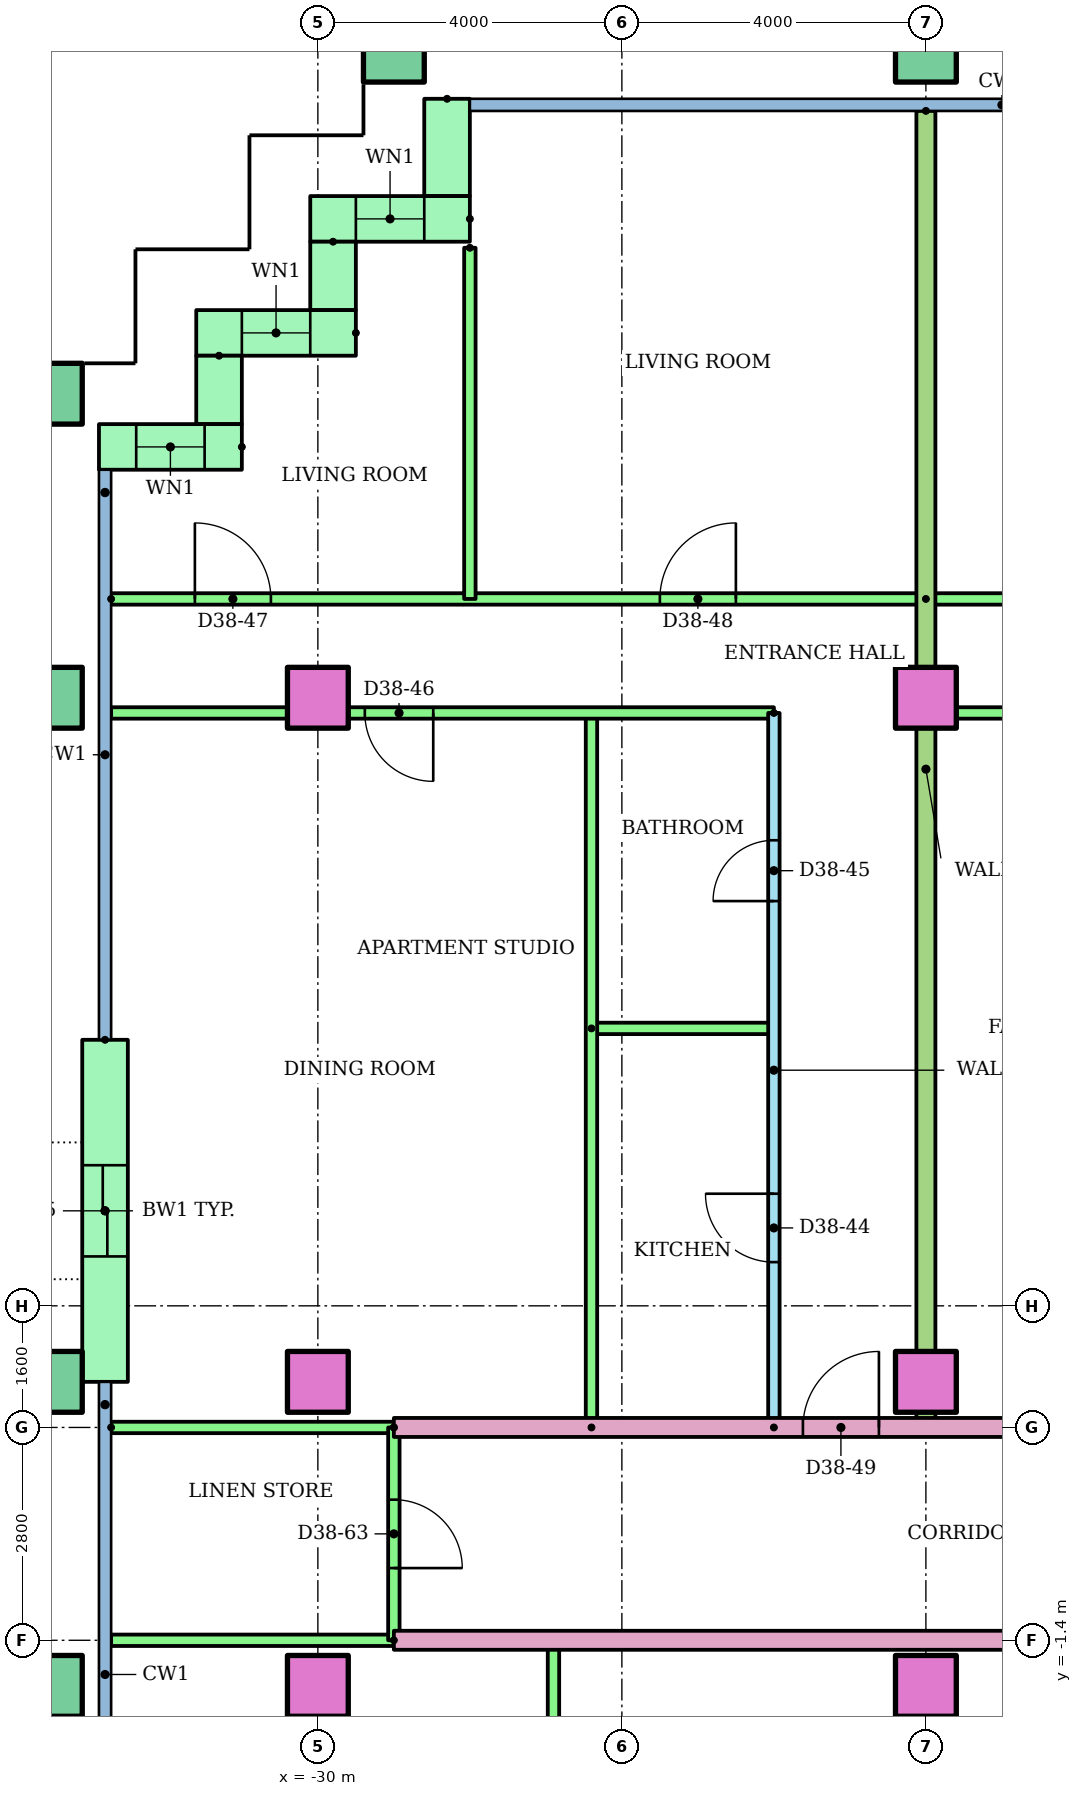
"""IFC4 building model, lengths in metres.
Left out: names, types, materials, properties, quantities, classifications, styles, units other than length and angle.
Written with IfcOpenShell. Run it as: python <this file> out.ifc"""

import sys

from ifc_helpers import new_model, si_unit, direction, frame, frame_2d, origin, origin_2d, place, context, subcontext, project, spatial, rectangle, hollow_rectangle, extrude, element, fill, save


model = new_model("IFC4")
c1 = context("Model", 3, precision=1e-05, world=origin(), true_north=direction((0.0, 1.0)))
c2 = subcontext(c1, "Body", "Model", "MODEL_VIEW")
j1 = project(units=[si_unit("LENGTHUNIT", "METRE"), si_unit("PLANEANGLEUNIT", "RADIAN")], contexts=[c1])
p1 = place(None, origin())
s1 = spatial("IfcSite", under=j1, at=p1, CompositionType="ELEMENT")
p2 = place(p1, origin())
s2 = spatial("IfcBuilding", under=s1, at=p2, CompositionType="ELEMENT")
p3 = place(p2, frame((0.0, 0.0, 145.4)))
s3 = spatial("IfcBuildingStorey", under=s2, at=p3, CompositionType="ELEMENT", Elevation=145.4)
p4 = place(p3, frame((-33.5, -2.0, 0.0)))
e1 = element("IfcColumn", 1, at=p4, inside=s3, PredefinedType="COLUMN", context=c2, shape_type="SweptSolid", body=[
    extrude(hollow_rectangle(XDim=0.8, YDim=0.8, WallThickness=0.04, at=origin_2d()), origin(), (0.0, 0.0, 1.0), 3.2),
])
for number, where in (
    (2, (-30.0, -2.0, 0.0)),
    (3, (-22.0, -2.0, 0.0)),
):
    element("IfcColumn", number, at=place(p3, frame(where)), inside=s3, PredefinedType="COLUMN", context=c2, shape_type="SweptSolid", body=[
        extrude(rectangle(XDim=0.8, YDim=0.8, at=origin_2d()), origin(), (0.0, 0.0, 1.0), 3.2),
    ])
p5 = place(p3, frame((-33.5, 2.0, 0.0)))
e4 = element("IfcColumn", 4, at=p5, inside=s3, PredefinedType="COLUMN", context=c2, shape_type="SweptSolid", body=[
    extrude(hollow_rectangle(XDim=0.8, YDim=0.8, WallThickness=0.04, at=origin_2d()), origin(), (0.0, 0.0, 1.0), 3.2),
])
for number, where in (
    (5, (-30.0, 2.0, 0.0)),
    (6, (-22.0, 2.0, 0.0)),
):
    element("IfcColumn", number, at=place(p3, frame(where)), inside=s3, PredefinedType="COLUMN", context=c2, shape_type="SweptSolid", body=[
        extrude(rectangle(XDim=0.8, YDim=0.8, at=origin_2d()), origin(), (0.0, 0.0, 1.0), 3.2),
    ])
p6 = place(p3, frame((-33.5, 11.0, 0.0)))
e7 = element("IfcColumn", 7, at=p6, inside=s3, PredefinedType="COLUMN", context=c2, shape_type="SweptSolid", body=[
    extrude(hollow_rectangle(XDim=0.8, YDim=0.8, WallThickness=0.04, at=origin_2d()), origin(), (0.0, 0.0, 1.0), 3.2),
])
for number, where in (
    (8, (-30.0, 11.0, 0.0)),
    (9, (-22.0, 11.0, 0.0)),
):
    element("IfcColumn", number, at=place(p3, frame(where)), inside=s3, PredefinedType="COLUMN", context=c2, shape_type="SweptSolid", body=[
        extrude(rectangle(XDim=0.8, YDim=0.8, at=origin_2d()), origin(), (0.0, 0.0, 1.0), 3.2),
    ])
for number, where in (
    (10, (-33.5, 15.0, 0.0)),
    (11, (-29.0, 19.5, 0.0)),
    (12, (-22.0, 19.5, 0.0)),
):
    element("IfcColumn", number, at=place(p3, frame(where)), inside=s3, PredefinedType="COLUMN", context=c2, shape_type="SweptSolid", body=[
        extrude(hollow_rectangle(XDim=0.8, YDim=0.8, WallThickness=0.04, at=origin_2d()), origin(), (0.0, 0.0, 1.0), 3.2),
    ])
p7 = place(p3, frame((-28.3, 18.88, 0.0), z_axis=(0.0, 0.0, 1.0), x_axis=(0.0, -1.0, 0.0)))
e13 = element("IfcWall", 13, at=p7, inside=s3, PredefinedType="STANDARD", context=c2, shape_type="SweptSolid", body=[
    extrude(rectangle(XDim=1.28, YDim=0.6, at=frame_2d((0.64, 0.0))), origin(), (0.0, 0.0, 1.0), 2.92),
])
p8 = place(p3, frame((-28.0, 17.3, 0.0), z_axis=(0.0, 0.0, 1.0), x_axis=(-1.0, 0.0, 0.0)))
e14 = element("IfcWall", 14, at=p8, inside=s3, PredefinedType="STANDARD", context=c2, shape_type="SweptSolid", body=[
    extrude(rectangle(XDim=2.1, YDim=0.6, at=frame_2d((1.05, 0.0))), origin(), (0.0, 0.0, 1.0), 2.92),
])
p9 = place(p8, frame((0.6, 0.0, 0.9)))
e15 = element("IfcOpeningElement", 15, at=p9, cuts=e14, PredefinedType="OPENING", context=c2, shape_type="SweptSolid", body=[
    extrude(rectangle(XDim=0.9, YDim=1.5, at=frame_2d((0.45, 0.75))), frame((0.0, 0.31, 0.0), z_axis=(0.0, -1.0, 0.0), x_axis=(1.0, 0.0, 0.0)), (0.0, 0.0, 1.0), 0.62),
])
p10 = place(p3, frame((-29.8, 17.0, 0.0), z_axis=(0.0, 0.0, 1.0), x_axis=(0.0, -1.0, 0.0)))
e16 = element("IfcWall", 16, at=p10, inside=s3, PredefinedType="STANDARD", context=c2, shape_type="SweptSolid", body=[
    extrude(rectangle(XDim=0.9, YDim=0.6, at=frame_2d((0.45, 0.0))), origin(), (0.0, 0.0, 1.0), 2.92),
])
p11 = place(p3, frame((-29.5, 15.8, 0.0), z_axis=(0.0, 0.0, 1.0), x_axis=(-1.0, 0.0, 0.0)))
e17 = element("IfcWall", 17, at=p11, inside=s3, PredefinedType="STANDARD", context=c2, shape_type="SweptSolid", body=[
    extrude(rectangle(XDim=2.1, YDim=0.6, at=frame_2d((1.05, 0.0))), origin(), (0.0, 0.0, 1.0), 2.92),
])
p12 = place(p11, frame((0.6, 0.0, 0.9)))
e18 = element("IfcOpeningElement", 18, at=p12, cuts=e17, PredefinedType="OPENING", context=c2, shape_type="SweptSolid", body=[
    extrude(rectangle(XDim=0.9, YDim=1.5, at=frame_2d((0.45, 0.75))), frame((0.0, 0.31, 0.0), z_axis=(0.0, -1.0, 0.0), x_axis=(1.0, 0.0, 0.0)), (0.0, 0.0, 1.0), 0.62),
])
p13 = place(p3, frame((-31.3, 15.5, 0.0), z_axis=(0.0, 0.0, 1.0), x_axis=(0.0, -1.0, 0.0)))
e19 = element("IfcWall", 19, at=p13, inside=s3, PredefinedType="STANDARD", context=c2, shape_type="SweptSolid", body=[
    extrude(rectangle(XDim=0.9, YDim=0.6, at=frame_2d((0.45, 0.0))), origin(), (0.0, 0.0, 1.0), 2.92),
])
p14 = place(p3, frame((-31.0, 14.3, 0.0), z_axis=(0.0, 0.0, 1.0), x_axis=(-1.0, 0.0, 0.0)))
e20 = element("IfcWall", 20, at=p14, inside=s3, PredefinedType="STANDARD", context=c2, shape_type="SweptSolid", body=[
    extrude(rectangle(XDim=1.88, YDim=0.6, at=frame_2d((0.94, 0.0))), origin(), (0.0, 0.0, 1.0), 2.92),
])
p15 = place(p14, frame((0.49, 0.0, 0.9)))
e21 = element("IfcOpeningElement", 21, at=p15, cuts=e20, PredefinedType="OPENING", context=c2, shape_type="SweptSolid", body=[
    extrude(rectangle(XDim=0.9, YDim=1.5, at=frame_2d((0.45, 0.75))), frame((0.0, 0.31, 0.0), z_axis=(0.0, -1.0, 0.0), x_axis=(1.0, 0.0, 0.0)), (0.0, 0.0, 1.0), 0.62),
])
p16 = place(p3, frame((-32.8, 6.5, 0.0), z_axis=(0.0, 0.0, 1.0), x_axis=(0.0, -1.0, 0.0)))
e22 = element("IfcWall", 22, at=p16, inside=s3, PredefinedType="STANDARD", context=c2, shape_type="SweptSolid", body=[
    extrude(rectangle(XDim=4.5, YDim=0.6, at=frame_2d((2.25, 0.0))), origin(), (0.0, 0.0, 1.0), 2.92),
])
p17 = place(p16, frame((1.65, 0.0, 0.0)))
e23 = element("IfcOpeningElement", 23, at=p17, cuts=e22, PredefinedType="OPENING", context=c2, shape_type="SweptSolid", body=[
    extrude(rectangle(XDim=1.2, YDim=2.1, at=frame_2d((0.6, 1.05))), frame((0.0, 0.31, 0.0), z_axis=(0.0, -1.0, 0.0), x_axis=(1.0, 0.0, 0.0)), (0.0, 0.0, 1.0), 0.62),
])
p18 = place(p3, frame((-26.9, -8.4, 0.0), z_axis=(0.0, 0.0, 1.0), x_axis=(0.0, 1.0, 0.0)))
e24 = element("IfcWall", 24, at=p18, inside=s3, PredefinedType="PARTITIONING", context=c2, shape_type="SweptSolid", body=[
    extrude(rectangle(XDim=7.0, YDim=0.15, at=frame_2d((3.5, 0.0))), origin(), (0.0, 0.0, 1.0), 2.4),
])
p19 = place(p3, frame((-14.0, -1.4, 0.0), z_axis=(0.0, 0.0, 1.0), x_axis=(-1.0, 0.0, 0.0)))
e25 = element("IfcWall", 25, at=p19, inside=s3, PredefinedType="PARTITIONING", context=c2, shape_type="SweptSolid", body=[
    extrude(rectangle(XDim=15.0, YDim=0.25, at=frame_2d((7.5, 0.0))), origin(), (0.0, 0.0, 1.0), 2.4),
])
p20 = place(p3, frame((-29.0, -1.4, 0.0), z_axis=(0.0, 0.0, 1.0), x_axis=(-1.0, 0.0, 0.0)))
e26 = element("IfcWall", 26, at=p20, inside=s3, PredefinedType="PARTITIONING", context=c2, shape_type="SweptSolid", body=[
    extrude(rectangle(XDim=3.72, YDim=0.15, at=frame_2d((1.86, 0.0))), origin(), (0.0, 0.0, 1.0), 2.4),
])
p21 = place(p3, frame((-24.0, 1.4, 0.0), z_axis=(0.0, 0.0, 1.0), x_axis=(0.0, 1.0, 0.0)))
e27 = element("IfcWall", 27, at=p21, inside=s3, PredefinedType="PARTITIONING", context=c2, shape_type="SweptSolid", body=[
    extrude(rectangle(XDim=9.4, YDim=0.15, at=frame_2d((4.7, 0.0))), origin(), (0.0, 0.0, 1.0), 2.4),
])
p22 = place(p21, frame((2.175, 0.0, 0.0)))
e28 = element("IfcOpeningElement", 28, at=p22, cuts=e27, PredefinedType="OPENING", context=c2, shape_type="SweptSolid", body=[
    extrude(rectangle(XDim=0.9, YDim=2.1, at=frame_2d((0.45, 1.05))), frame((0.0, 0.085, 0.0), z_axis=(0.0, -1.0, 0.0), x_axis=(1.0, 0.0, 0.0)), (0.0, 0.0, 1.0), 0.17),
])
p23 = place(p21, frame((6.925, 0.0, 0.0)))
e29 = element("IfcOpeningElement", 29, at=p23, cuts=e27, PredefinedType="OPENING", context=c2, shape_type="SweptSolid", body=[
    extrude(rectangle(XDim=0.8, YDim=2.1, at=frame_2d((0.4, 1.05))), frame((0.0, 0.085, 0.0), z_axis=(0.0, -1.0, 0.0), x_axis=(1.0, 0.0, 0.0)), (0.0, 0.0, 1.0), 0.17),
])
p24 = place(p3, frame((-26.4, 6.65, 0.0)))
e30 = element("IfcWall", 30, at=p24, inside=s3, PredefinedType="PARTITIONING", context=c2, shape_type="SweptSolid", body=[
    extrude(rectangle(XDim=2.4, YDim=0.15, at=frame_2d((1.2, 0.0))), origin(), (0.0, 0.0, 1.0), 2.4),
])
p25 = place(p3, frame((-26.4, 1.4, 0.0), z_axis=(0.0, 0.0, 1.0), x_axis=(0.0, 1.0, 0.0)))
e31 = element("IfcWall", 31, at=p25, inside=s3, PredefinedType="PARTITIONING", context=c2, shape_type="SweptSolid", body=[
    extrude(rectangle(XDim=9.4, YDim=0.15, at=frame_2d((4.7, 0.0))), origin(), (0.0, 0.0, 1.0), 2.4),
])
p26 = place(p3, frame((-24.0, 10.8, 0.0), z_axis=(0.0, 0.0, 1.0), x_axis=(-1.0, 0.0, 0.0)))
e32 = element("IfcWall", 32, at=p26, inside=s3, PredefinedType="PARTITIONING", context=c2, shape_type="SweptSolid", body=[
    extrude(rectangle(XDim=8.72, YDim=0.15, at=frame_2d((4.36, 0.0))), origin(), (0.0, 0.0, 1.0), 2.4),
])
p27 = place(p26, frame((4.482, 0.0, 0.0)))
e33 = element("IfcOpeningElement", 33, at=p27, cuts=e32, PredefinedType="OPENING", context=c2, shape_type="SweptSolid", body=[
    extrude(rectangle(XDim=0.9, YDim=2.1, at=frame_2d((0.45, 1.05))), frame((0.0, 0.085, 0.0), z_axis=(0.0, -1.0, 0.0), x_axis=(1.0, 0.0, 0.0)), (0.0, 0.0, 1.0), 0.17),
])
p28 = place(p3, frame((-32.72, 12.3, 0.0)))
e34 = element("IfcWall", 34, at=p28, inside=s3, PredefinedType="PARTITIONING", context=c2, shape_type="SweptSolid", body=[
    extrude(rectangle(XDim=10.72, YDim=0.15, at=frame_2d((5.36, 0.0))), origin(), (0.0, 0.0, 1.0), 2.4),
])
p29 = place(p28, frame((1.102, 0.0, 0.0)))
e35 = element("IfcOpeningElement", 35, at=p29, cuts=e34, PredefinedType="OPENING", context=c2, shape_type="SweptSolid", body=[
    extrude(rectangle(XDim=1.0, YDim=2.1, at=frame_2d((0.5, 1.05))), frame((0.0, 0.085, 0.0), z_axis=(0.0, -1.0, 0.0), x_axis=(1.0, 0.0, 0.0)), (0.0, 0.0, 1.0), 0.17),
])
p30 = place(p28, frame((7.22, 0.0, 0.0)))
e36 = element("IfcOpeningElement", 36, at=p30, cuts=e34, PredefinedType="OPENING", context=c2, shape_type="SweptSolid", body=[
    extrude(rectangle(XDim=1.0, YDim=2.1, at=frame_2d((0.5, 1.05))), frame((0.0, 0.085, 0.0), z_axis=(0.0, -1.0, 0.0), x_axis=(1.0, 0.0, 0.0)), (0.0, 0.0, 1.0), 0.17),
])
p31 = place(p3, frame((-28.0, 16.92, 0.0), z_axis=(0.0, 0.0, 1.0), x_axis=(0.0, -1.0, 0.0)))
e37 = element("IfcWall", 37, at=p31, inside=s3, PredefinedType="PARTITIONING", context=c2, shape_type="SweptSolid", body=[
    extrude(rectangle(XDim=4.62, YDim=0.15, at=frame_2d((2.31, 0.0))), origin(), (0.0, 0.0, 1.0), 2.4),
])
p32 = place(p3, frame((-16.0, 10.8, 0.0), z_axis=(0.0, 0.0, 1.0), x_axis=(-1.0, 0.0, 0.0)))
e38 = element("IfcWall", 38, at=p32, inside=s3, PredefinedType="PARTITIONING", context=c2, shape_type="SweptSolid", body=[
    extrude(rectangle(XDim=6.0, YDim=0.15, at=frame_2d((3.0, 0.0))), origin(), (0.0, 0.0, 1.0), 2.4),
])
p33 = place(p32, frame((3.75, 0.0, 0.0)))
e39 = element("IfcOpeningElement", 39, at=p33, cuts=e38, PredefinedType="OPENING", context=c2, shape_type="SweptSolid", body=[
    extrude(rectangle(XDim=0.9, YDim=2.1, at=frame_2d((0.45, 1.05))), frame((0.0, 0.085, 0.0), z_axis=(0.0, -1.0, 0.0), x_axis=(1.0, 0.0, 0.0)), (0.0, 0.0, 1.0), 0.17),
])
p34 = place(p3, frame((-22.0, 12.3, 0.0)))
e40 = element("IfcWall", 40, at=p34, inside=s3, PredefinedType="PARTITIONING", context=c2, shape_type="SweptSolid", body=[
    extrude(rectangle(XDim=8.0, YDim=0.15, at=frame_2d((4.0, 0.0))), origin(), (0.0, 0.0, 1.0), 2.4),
])
p35 = place(p34, frame((3.5, 0.0, 0.0)))
e41 = element("IfcOpeningElement", 41, at=p35, cuts=e40, PredefinedType="OPENING", context=c2, shape_type="SweptSolid", body=[
    extrude(rectangle(XDim=1.0, YDim=2.1, at=frame_2d((0.5, 1.05))), frame((0.0, 0.085, 0.0), z_axis=(0.0, -1.0, 0.0), x_axis=(1.0, 0.0, 0.0)), (0.0, 0.0, 1.0), 0.17),
])
p36 = place(p3, frame((-22.0, 18.721, 0.0), z_axis=(0.0, 0.0, 1.0), x_axis=(0.0, -1.0, 0.0)))
e42 = element("IfcWall", 42, at=p36, inside=s3, PredefinedType="PARTITIONING", context=c2, shape_type="SweptSolid", body=[
    extrude(rectangle(XDim=17.321, YDim=0.25, at=frame_2d((8.661, 0.0))), origin(), (0.0, 0.0, 1.0), 2.4),
])
p37 = place(p3, frame((-29.0, 1.4, 0.0)))
e43 = element("IfcWall", 43, at=p37, inside=s3, PredefinedType="PARTITIONING", context=c2, shape_type="SweptSolid", body=[
    extrude(rectangle(XDim=15.0, YDim=0.25, at=frame_2d((7.5, 0.0))), origin(), (0.0, 0.0, 1.0), 2.4),
])
p38 = place(p37, frame((5.382, 0.0, 0.0)))
e44 = element("IfcOpeningElement", 44, at=p38, cuts=e43, PredefinedType="OPENING", context=c2, shape_type="SweptSolid", body=[
    extrude(rectangle(XDim=1.0, YDim=2.1, at=frame_2d((0.5, 1.05))), frame((0.0, 0.135, 0.0), z_axis=(0.0, -1.0, 0.0), x_axis=(1.0, 0.0, 0.0)), (0.0, 0.0, 1.0), 0.27),
])
p39 = place(p37, frame((13.5, 0.0, 0.0)))
e45 = element("IfcOpeningElement", 45, at=p39, cuts=e43, PredefinedType="OPENING", context=c2, shape_type="SweptSolid", body=[
    extrude(rectangle(XDim=1.0, YDim=2.1, at=frame_2d((0.5, 1.05))), frame((0.0, 0.135, 0.0), z_axis=(0.0, -1.0, 0.0), x_axis=(1.0, 0.0, 0.0)), (0.0, 0.0, 1.0), 0.27),
])
p40 = place(p3, frame((-32.72, 1.4, 0.0)))
e46 = element("IfcWall", 46, at=p40, inside=s3, PredefinedType="PARTITIONING", context=c2, shape_type="SweptSolid", body=[
    extrude(rectangle(XDim=3.72, YDim=0.15, at=frame_2d((1.86, 0.0))), origin(), (0.0, 0.0, 1.0), 2.4),
])
p41 = place(p3, frame((-29.0, 1.4, 0.0), z_axis=(0.0, 0.0, 1.0), x_axis=(0.0, -1.0, 0.0)))
e47 = element("IfcWall", 47, at=p41, inside=s3, PredefinedType="PARTITIONING", context=c2, shape_type="SweptSolid", body=[
    extrude(rectangle(XDim=2.8, YDim=0.15, at=frame_2d((1.4, 0.0))), origin(), (0.0, 0.0, 1.0), 2.4),
])
p42 = place(p41, frame((0.95, 0.0, 0.0)))
e48 = element("IfcOpeningElement", 48, at=p42, cuts=e47, PredefinedType="OPENING", context=c2, shape_type="SweptSolid", body=[
    extrude(rectangle(XDim=0.9, YDim=2.1, at=frame_2d((0.45, 1.05))), frame((0.0, 0.085, 0.0), z_axis=(0.0, -1.0, 0.0), x_axis=(1.0, 0.0, 0.0)), (0.0, 0.0, 1.0), 0.17),
])
p43 = place(p9, origin())
e49 = element("IfcWindow", 49, at=p43, inside=s3, PartitioningType="SINGLE_PANEL", PredefinedType="WINDOW", context=c2, shape_type="SweptSolid", body=[
    extrude(rectangle(XDim=0.9, YDim=1.5, at=frame_2d((0.45, 0.75))), frame((0.0, 0.03, 0.0), z_axis=(0.0, -1.0, 0.0), x_axis=(1.0, 0.0, 0.0)), (0.0, 0.0, 1.0), 0.06),
])
fill(e15, e49)
p44 = place(p12, origin())
e50 = element("IfcWindow", 50, at=p44, inside=s3, PartitioningType="SINGLE_PANEL", PredefinedType="WINDOW", context=c2, shape_type="SweptSolid", body=[
    extrude(rectangle(XDim=0.9, YDim=1.5, at=frame_2d((0.45, 0.75))), frame((0.0, 0.03, 0.0), z_axis=(0.0, -1.0, 0.0), x_axis=(1.0, 0.0, 0.0)), (0.0, 0.0, 1.0), 0.06),
])
fill(e18, e50)
p45 = place(p15, origin())
e51 = element("IfcWindow", 51, at=p45, inside=s3, PartitioningType="SINGLE_PANEL", PredefinedType="WINDOW", context=c2, shape_type="SweptSolid", body=[
    extrude(rectangle(XDim=0.9, YDim=1.5, at=frame_2d((0.45, 0.75))), frame((0.0, 0.03, 0.0), z_axis=(0.0, -1.0, 0.0), x_axis=(1.0, 0.0, 0.0)), (0.0, 0.0, 1.0), 0.06),
])
fill(e21, e51)
p46 = place(p22, origin())
e52 = element("IfcDoor", 52, at=p46, inside=s3, OperationType="SINGLE_SWING_RIGHT", PredefinedType="DOOR", context=c2, shape_type="SweptSolid", body=[
    extrude(rectangle(XDim=0.9, YDim=2.1, at=frame_2d((0.45, 1.05))), frame((0.0, 0.025, 0.0), z_axis=(0.0, -1.0, 0.0), x_axis=(1.0, 0.0, 0.0)), (0.0, 0.0, 1.0), 0.05),
])
fill(e28, e52)
p47 = place(p23, origin())
e53 = element("IfcDoor", 53, at=p47, inside=s3, OperationType="SINGLE_SWING_LEFT", PredefinedType="DOOR", context=c2, shape_type="SweptSolid", body=[
    extrude(rectangle(XDim=0.8, YDim=2.1, at=frame_2d((0.4, 1.05))), frame((0.0, 0.025, 0.0), z_axis=(0.0, -1.0, 0.0), x_axis=(1.0, 0.0, 0.0)), (0.0, 0.0, 1.0), 0.05),
])
fill(e29, e53)
p48 = place(p27, origin())
e54 = element("IfcDoor", 54, at=p48, inside=s3, OperationType="SINGLE_SWING_LEFT", PredefinedType="DOOR", context=c2, shape_type="SweptSolid", body=[
    extrude(rectangle(XDim=0.9, YDim=2.1, at=frame_2d((0.45, 1.05))), frame((0.0, 0.025, 0.0), z_axis=(0.0, -1.0, 0.0), x_axis=(1.0, 0.0, 0.0)), (0.0, 0.0, 1.0), 0.05),
])
fill(e33, e54)
p49 = place(p29, origin())
e55 = element("IfcDoor", 55, at=p49, inside=s3, OperationType="SINGLE_SWING_LEFT", PredefinedType="DOOR", context=c2, shape_type="SweptSolid", body=[
    extrude(rectangle(XDim=1.0, YDim=2.1, at=frame_2d((0.5, 1.05))), frame((0.0, 0.025, 0.0), z_axis=(0.0, -1.0, 0.0), x_axis=(1.0, 0.0, 0.0)), (0.0, 0.0, 1.0), 0.05),
])
fill(e35, e55)
p50 = place(p30, origin())
e56 = element("IfcDoor", 56, at=p50, inside=s3, OperationType="SINGLE_SWING_RIGHT", PredefinedType="DOOR", context=c2, shape_type="SweptSolid", body=[
    extrude(rectangle(XDim=1.0, YDim=2.1, at=frame_2d((0.5, 1.05))), frame((0.0, 0.025, 0.0), z_axis=(0.0, -1.0, 0.0), x_axis=(1.0, 0.0, 0.0)), (0.0, 0.0, 1.0), 0.05),
])
fill(e36, e56)
p51 = place(p38, origin())
e57 = element("IfcDoor", 57, at=p51, inside=s3, OperationType="SINGLE_SWING_RIGHT", PredefinedType="DOOR", context=c2, shape_type="SweptSolid", body=[
    extrude(rectangle(XDim=1.0, YDim=2.1, at=frame_2d((0.5, 1.05))), frame((0.0, 0.025, 0.0), z_axis=(0.0, -1.0, 0.0), x_axis=(1.0, 0.0, 0.0)), (0.0, 0.0, 1.0), 0.05),
])
fill(e44, e57)
p52 = place(p42, origin())
e58 = element("IfcDoor", 58, at=p52, inside=s3, OperationType="SINGLE_SWING_RIGHT", PredefinedType="DOOR", context=c2, shape_type="SweptSolid", body=[
    extrude(rectangle(XDim=0.9, YDim=2.1, at=frame_2d((0.45, 1.05))), frame((0.0, 0.025, 0.0), z_axis=(0.0, -1.0, 0.0), x_axis=(1.0, 0.0, 0.0)), (0.0, 0.0, 1.0), 0.05),
])
fill(e48, e58)
p53 = place(p17, origin())
e59 = element("IfcDoor", 59, at=p53, inside=s3, OperationType="SLIDING_TO_LEFT", PredefinedType="DOOR", context=c2, shape_type="SweptSolid", body=[
    extrude(rectangle(XDim=1.2, YDim=2.1, at=frame_2d((0.6, 1.05))), frame((0.0, 0.025, 0.0), z_axis=(0.0, -1.0, 0.0), x_axis=(1.0, 0.0, 0.0)), (0.0, 0.0, 1.0), 0.05),
])
fill(e23, e59)
save(model, sys.argv[1])
